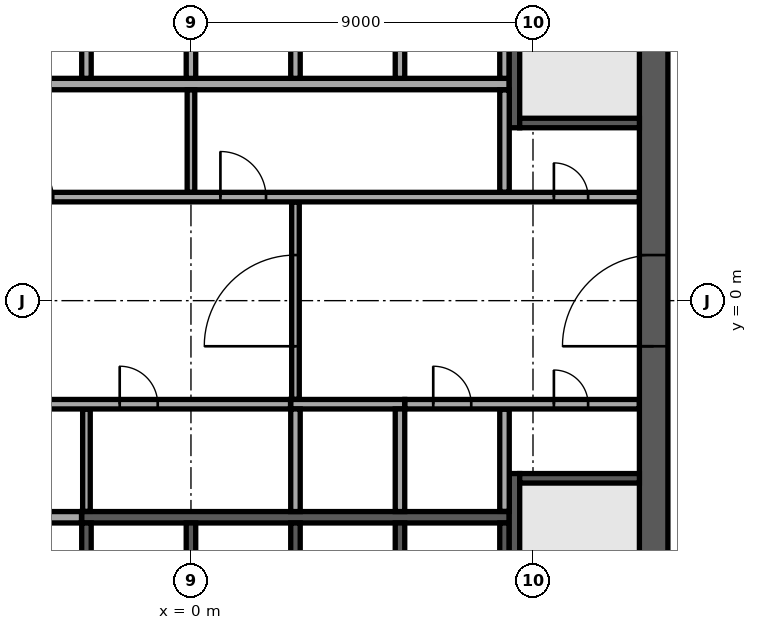
"""IFC4 building model, lengths in metres.
Left out: names, types, materials, properties, quantities, classifications, styles, units other than length and angle.
Written with IfcOpenShell. Run it as: python <this file> out.ifc"""

import sys

from ifc_helpers import new_model, si_unit, direction, frame, frame_2d, origin, place, context, subcontext, project, spatial, rectangle, extrude, element, fill, save


model = new_model("IFC4")
c1 = context("Model", 3, precision=1e-05, world=origin(), true_north=direction((0.0, 1.0)))
c2 = subcontext(c1, "Body", "Model", "MODEL_VIEW")
j1 = project(units=[si_unit("LENGTHUNIT", "METRE"), si_unit("PLANEANGLEUNIT", "RADIAN")], contexts=[c1])
p1 = place(None, origin())
s1 = spatial("IfcSite", under=j1, at=p1, CompositionType="ELEMENT")
p2 = place(p1, origin())
s2 = spatial("IfcBuilding", under=s1, at=p2, CompositionType="ELEMENT")
p3 = place(p2, frame((0.0, 0.0, 242.9)))
s3 = spatial("IfcBuildingStorey", under=s2, at=p3, CompositionType="ELEMENT", Elevation=242.9)
p4 = place(p3, frame((12.175, -11.8, 0.0), z_axis=(0.0, 0.0, 1.0), x_axis=(0.0, 1.0, 0.0)))
e1 = element("IfcWall", 1, at=p4, inside=s3, PredefinedType="SHEAR", context=c2, shape_type="SweptSolid", body=[
    extrude(rectangle(XDim=23.6, YDim=0.75, at=frame_2d((11.8, 0.0))), origin(), (0.0, 0.0, 1.0), 3.64),
])
p5 = place(p4, frame((10.6, 0.0, 0.0)))
e2 = element("IfcOpeningElement", 2, at=p5, cuts=e1, PredefinedType="OPENING", context=c2, shape_type="SweptSolid", body=[
    extrude(rectangle(XDim=2.4, YDim=2.4, at=frame_2d((1.2, 1.2))), frame((0.0, 0.385, 0.0), z_axis=(0.0, -1.0, 0.0), x_axis=(1.0, 0.0, 0.0)), (0.0, 0.0, 1.0), 0.77),
])
p6 = place(p3, frame((-8.375, 5.7, 0.0), z_axis=(0.0, 0.0, 1.0), x_axis=(1.0, 0.0, 0.0)))
e3 = element("IfcWall", 3, at=p6, inside=s3, PredefinedType="SOLIDWALL", context=c2, shape_type="SweptSolid", body=[
    extrude(rectangle(XDim=16.75, YDim=0.3, at=frame_2d((8.375, 0.0))), origin(), (0.0, 0.0, 1.0), 3.64),
])
p7 = place(p3, frame((-2.875, -5.7, 0.0), z_axis=(0.0, 0.0, 1.0), x_axis=(1.0, 0.0, 0.0)))
e4 = element("IfcWall", 4, at=p7, inside=s3, PredefinedType="SOLIDWALL", context=c2, shape_type="SweptSolid", body=[
    extrude(rectangle(XDim=11.25, YDim=0.3, at=frame_2d((5.625, 0.0))), origin(), (0.0, 0.0, 1.0), 3.64),
])
for number, where, z_axis, x_axis in (
    (5, (-2.75, 5.85, 0.0), (0.0, 0.0, 1.0), (0.0, 1.0, 0.0)),
    (6, (0.0, 5.85, 0.0), (0.0, 0.0, 1.0), (0.0, 1.0, 0.0)),
    (7, (2.75, 5.85, 0.0), (0.0, 0.0, 1.0), (0.0, 1.0, 0.0)),
    (8, (5.5, 5.85, 0.0), (0.0, 0.0, 1.0), (0.0, 1.0, 0.0)),
    (9, (8.25, 5.85, 0.0), (0.0, 0.0, 1.0), (0.0, 1.0, 0.0)),
):
    element("IfcWall", number, at=place(p3, frame(where, z_axis=z_axis, x_axis=x_axis)), inside=s3, PredefinedType="SOLIDWALL", context=c2, shape_type="SweptSolid", body=[
        extrude(rectangle(XDim=2.7, YDim=0.25, at=frame_2d((1.35, 0.0))), origin(), (0.0, 0.0, 1.0), 3.64),
    ])
p8 = place(p3, frame((2.625, -2.725, 0.0), z_axis=(0.0, 0.0, 1.0), x_axis=(1.0, 0.0, 0.0)))
e10 = element("IfcWall", 10, at=p8, inside=s3, PredefinedType="SOLIDWALL", context=c2, shape_type="SweptSolid", body=[
    extrude(rectangle(XDim=3.0, YDim=0.25, at=frame_2d((1.5, 0.0))), origin(), (0.0, 0.0, 1.0), 3.64),
])
for number, where, z_axis, x_axis in (
    (11, (2.75, -5.55, 0.0), (0.0, 0.0, 1.0), (0.0, 1.0, 0.0)),
    (12, (5.5, -5.55, 0.0), (0.0, 0.0, 1.0), (0.0, 1.0, 0.0)),
    (13, (-2.75, -8.55, 0.0), (0.0, 0.0, 1.0), (0.0, 1.0, 0.0)),
    (14, (0.0, -8.55, 0.0), (0.0, 0.0, 1.0), (0.0, 1.0, 0.0)),
    (15, (2.75, -8.55, 0.0), (0.0, 0.0, 1.0), (0.0, 1.0, 0.0)),
    (16, (5.5, -8.55, 0.0), (0.0, 0.0, 1.0), (0.0, 1.0, 0.0)),
    (17, (8.25, -8.55, 0.0), (0.0, 0.0, 1.0), (0.0, 1.0, 0.0)),
):
    element("IfcWall", number, at=place(p3, frame(where, z_axis=z_axis, x_axis=x_axis)), inside=s3, PredefinedType="SOLIDWALL", context=c2, shape_type="SweptSolid", body=[
        extrude(rectangle(XDim=2.7, YDim=0.25, at=frame_2d((1.35, 0.0))), origin(), (0.0, 0.0, 1.0), 3.64),
    ])
p9 = place(p3, frame((8.512, 4.55, 0.0), z_axis=(0.0, 0.0, 1.0), x_axis=(0.0, 1.0, 0.0)))
e18 = element("IfcWall", 18, at=p9, inside=s3, PredefinedType="SOLIDWALL", context=c2, shape_type="SweptSolid", body=[
    extrude(rectangle(XDim=7.25, YDim=0.275, at=frame_2d((3.625, 0.0))), origin(), (0.0, 0.0, 1.0), 3.64),
])
p10 = place(p9, frame((6.0, 0.0, 0.0)))
e19 = element("IfcOpeningElement", 19, at=p10, cuts=e18, PredefinedType="OPENING", context=c2, shape_type="SweptSolid", body=[
    extrude(rectangle(XDim=1.0, YDim=2.1, at=frame_2d((0.5, 1.05))), frame((0.0, 0.147, 0.0), z_axis=(0.0, -1.0, 0.0), x_axis=(1.0, 0.0, 0.0)), (0.0, 0.0, 1.0), 0.295),
])
p11 = place(p3, frame((8.65, 4.675, 0.0), z_axis=(0.0, 0.0, 1.0), x_axis=(1.0, 0.0, 0.0)))
e20 = element("IfcWall", 20, at=p11, inside=s3, PredefinedType="SOLIDWALL", context=c2, shape_type="SweptSolid", body=[
    extrude(rectangle(XDim=3.15, YDim=0.25, at=frame_2d((1.575, 0.0))), origin(), (0.0, 0.0, 1.0), 3.64),
])
p12 = place(p3, frame((8.512, -4.55, 0.0), z_axis=(0.0, 0.0, 1.0), x_axis=(0.0, -1.0, 0.0)))
e21 = element("IfcWall", 21, at=p12, inside=s3, PredefinedType="SOLIDWALL", context=c2, shape_type="SweptSolid", body=[
    extrude(rectangle(XDim=7.25, YDim=0.275, at=frame_2d((3.625, 0.0))), origin(), (0.0, 0.0, 1.0), 3.64),
])
p13 = place(p12, frame((6.0, 0.0, 0.0)))
e22 = element("IfcOpeningElement", 22, at=p13, cuts=e21, PredefinedType="OPENING", context=c2, shape_type="SweptSolid", body=[
    extrude(rectangle(XDim=1.0, YDim=2.1, at=frame_2d((0.5, 1.05))), frame((0.0, 0.147, 0.0), z_axis=(0.0, -1.0, 0.0), x_axis=(1.0, 0.0, 0.0)), (0.0, 0.0, 1.0), 0.295),
])
p14 = place(p3, frame((8.65, -4.675, 0.0), z_axis=(0.0, 0.0, 1.0), x_axis=(1.0, 0.0, 0.0)))
e23 = element("IfcWall", 23, at=p14, inside=s3, PredefinedType="SOLIDWALL", context=c2, shape_type="SweptSolid", body=[
    extrude(rectangle(XDim=3.15, YDim=0.25, at=frame_2d((1.575, 0.0))), origin(), (0.0, 0.0, 1.0), 3.64),
])
p15 = place(p3, frame((-8.35, -5.7, 0.0), z_axis=(0.0, 0.0, 1.0), x_axis=(1.0, 0.0, 0.0)))
e24 = element("IfcWall", 24, at=p15, inside=s3, PredefinedType="PARTITIONING", context=c2, shape_type="SweptSolid", body=[
    extrude(rectangle(XDim=5.47, YDim=0.3, at=frame_2d((2.735, 0.0))), origin(), (0.0, 0.0, 1.0), 3.64),
])
p16 = place(p3, frame((-2.75, -5.545, 0.0), z_axis=(0.0, 0.0, 1.0), x_axis=(0.0, 1.0, 0.0)))
e25 = element("IfcWall", 25, at=p16, inside=s3, PredefinedType="PARTITIONING", context=c2, shape_type="SweptSolid", body=[
    extrude(rectangle(XDim=2.69, YDim=0.2, at=frame_2d((1.345, 0.0))), origin(), (0.0, 0.0, 1.0), 3.64),
])
p17 = place(p3, frame((8.25, -5.545, 0.0), z_axis=(0.0, 0.0, 1.0), x_axis=(0.0, 1.0, 0.0)))
e26 = element("IfcWall", 26, at=p17, inside=s3, PredefinedType="PARTITIONING", context=c2, shape_type="SweptSolid", body=[
    extrude(rectangle(XDim=2.69, YDim=0.25, at=frame_2d((1.345, 0.0))), origin(), (0.0, 0.0, 1.0), 3.64),
])
p18 = place(p3, frame((-11.795, -2.725, 0.0), z_axis=(0.0, 0.0, 1.0), x_axis=(1.0, 0.0, 0.0)))
e27 = element("IfcWall", 27, at=p18, inside=s3, PredefinedType="PARTITIONING", context=c2, shape_type="SweptSolid", body=[
    extrude(rectangle(XDim=14.415, YDim=0.25, at=frame_2d((7.208, 0.0))), origin(), (0.0, 0.0, 1.0), 3.64),
])
p19 = place(p18, frame((1.295, 0.0, 0.0)))
e28 = element("IfcOpeningElement", 28, at=p19, cuts=e27, PredefinedType="OPENING", context=c2, shape_type="SweptSolid", body=[
    extrude(rectangle(XDim=1.0, YDim=2.1, at=frame_2d((0.5, 1.05))), frame((0.0, 0.135, 0.0), z_axis=(0.0, -1.0, 0.0), x_axis=(1.0, 0.0, 0.0)), (0.0, 0.0, 1.0), 0.27),
])
p20 = place(p18, frame((4.42, 0.0, 0.0)))
e29 = element("IfcOpeningElement", 29, at=p20, cuts=e27, PredefinedType="OPENING", context=c2, shape_type="SweptSolid", body=[
    extrude(rectangle(XDim=1.0, YDim=2.1, at=frame_2d((0.5, 1.05))), frame((0.0, 0.135, 0.0), z_axis=(0.0, -1.0, 0.0), x_axis=(1.0, 0.0, 0.0)), (0.0, 0.0, 1.0), 0.27),
])
p21 = place(p18, frame((9.92, 0.0, 0.0)))
e30 = element("IfcOpeningElement", 30, at=p21, cuts=e27, PredefinedType="OPENING", context=c2, shape_type="SweptSolid", body=[
    extrude(rectangle(XDim=1.0, YDim=2.1, at=frame_2d((0.5, 1.05))), frame((0.0, 0.135, 0.0), z_axis=(0.0, -1.0, 0.0), x_axis=(1.0, 0.0, 0.0)), (0.0, 0.0, 1.0), 0.27),
])
p22 = place(p3, frame((5.63, -2.725, 0.0), z_axis=(0.0, 0.0, 1.0), x_axis=(1.0, 0.0, 0.0)))
e31 = element("IfcWall", 31, at=p22, inside=s3, PredefinedType="PARTITIONING", context=c2, shape_type="SweptSolid", body=[
    extrude(rectangle(XDim=6.165, YDim=0.25, at=frame_2d((3.083, 0.0))), origin(), (0.0, 0.0, 1.0), 3.64),
])
p23 = place(p22, frame((0.745, 0.0, 0.0)))
e32 = element("IfcOpeningElement", 32, at=p23, cuts=e31, PredefinedType="OPENING", context=c2, shape_type="SweptSolid", body=[
    extrude(rectangle(XDim=1.0, YDim=2.1, at=frame_2d((0.5, 1.05))), frame((0.0, 0.135, 0.0), z_axis=(0.0, -1.0, 0.0), x_axis=(1.0, 0.0, 0.0)), (0.0, 0.0, 1.0), 0.27),
])
p24 = place(p22, frame((3.92, 0.0, 0.0)))
e33 = element("IfcOpeningElement", 33, at=p24, cuts=e31, PredefinedType="OPENING", context=c2, shape_type="SweptSolid", body=[
    extrude(rectangle(XDim=0.9, YDim=2.1, at=frame_2d((0.45, 1.05))), frame((0.0, 0.135, 0.0), z_axis=(0.0, -1.0, 0.0), x_axis=(1.0, 0.0, 0.0)), (0.0, 0.0, 1.0), 0.27),
])
p25 = place(p3, frame((2.75, -2.595, 0.0), z_axis=(0.0, 0.0, 1.0), x_axis=(0.0, 1.0, 0.0)))
e34 = element("IfcWall", 34, at=p25, inside=s3, PredefinedType="PARTITIONING", context=c2, shape_type="SweptSolid", body=[
    extrude(rectangle(XDim=5.19, YDim=0.2, at=frame_2d((2.595, 0.0))), origin(), (0.0, 0.0, 1.0), 3.64),
])
p26 = place(p25, frame((1.395, 0.0, 0.0)))
e35 = element("IfcOpeningElement", 35, at=p26, cuts=e34, PredefinedType="OPENING", context=c2, shape_type="SweptSolid", body=[
    extrude(rectangle(XDim=2.4, YDim=2.4, at=frame_2d((1.2, 1.2))), frame((0.0, 0.11, 0.0), z_axis=(0.0, -1.0, 0.0), x_axis=(1.0, 0.0, 0.0)), (0.0, 0.0, 1.0), 0.22),
])
p27 = place(p3, frame((-11.795, 2.725, 0.0), z_axis=(0.0, 0.0, 1.0), x_axis=(1.0, 0.0, 0.0)))
e36 = element("IfcWall", 36, at=p27, inside=s3, PredefinedType="PARTITIONING", context=c2, shape_type="SweptSolid", body=[
    extrude(rectangle(XDim=23.59, YDim=0.25, at=frame_2d((11.795, 0.0))), origin(), (0.0, 0.0, 1.0), 3.64),
])
p28 = place(p27, frame((21.345, 0.0, 0.0)))
e37 = element("IfcOpeningElement", 37, at=p28, cuts=e36, PredefinedType="OPENING", context=c2, shape_type="SweptSolid", body=[
    extrude(rectangle(XDim=0.9, YDim=2.1, at=frame_2d((0.45, 1.05))), frame((0.0, 0.135, 0.0), z_axis=(0.0, -1.0, 0.0), x_axis=(1.0, 0.0, 0.0)), (0.0, 0.0, 1.0), 0.27),
])
p29 = place(p27, frame((1.345, 0.0, 0.0)))
e38 = element("IfcOpeningElement", 38, at=p29, cuts=e36, PredefinedType="OPENING", context=c2, shape_type="SweptSolid", body=[
    extrude(rectangle(XDim=0.9, YDim=2.1, at=frame_2d((0.45, 1.05))), frame((0.0, 0.135, 0.0), z_axis=(0.0, -1.0, 0.0), x_axis=(1.0, 0.0, 0.0)), (0.0, 0.0, 1.0), 0.27),
])
p30 = place(p27, frame((4.42, 0.0, 0.0)))
e39 = element("IfcOpeningElement", 39, at=p30, cuts=e36, PredefinedType="OPENING", context=c2, shape_type="SweptSolid", body=[
    extrude(rectangle(XDim=1.0, YDim=2.1, at=frame_2d((0.5, 1.05))), frame((0.0, 0.135, 0.0), z_axis=(0.0, -1.0, 0.0), x_axis=(1.0, 0.0, 0.0)), (0.0, 0.0, 1.0), 0.27),
])
p31 = place(p27, frame((7.17, 0.0, 0.0)))
e40 = element("IfcOpeningElement", 40, at=p31, cuts=e36, PredefinedType="OPENING", context=c2, shape_type="SweptSolid", body=[
    extrude(rectangle(XDim=1.0, YDim=2.1, at=frame_2d((0.5, 1.05))), frame((0.0, 0.135, 0.0), z_axis=(0.0, -1.0, 0.0), x_axis=(1.0, 0.0, 0.0)), (0.0, 0.0, 1.0), 0.27),
])
p32 = place(p27, frame((12.57, 0.0, 0.0)))
e41 = element("IfcOpeningElement", 41, at=p32, cuts=e36, PredefinedType="OPENING", context=c2, shape_type="SweptSolid", body=[
    extrude(rectangle(XDim=1.2, YDim=2.1, at=frame_2d((0.6, 1.05))), frame((0.0, 0.135, 0.0), z_axis=(0.0, -1.0, 0.0), x_axis=(1.0, 0.0, 0.0)), (0.0, 0.0, 1.0), 0.27),
])
p33 = place(p3, frame((0.0, 2.855, 0.0), z_axis=(0.0, 0.0, 1.0), x_axis=(0.0, 1.0, 0.0)))
e42 = element("IfcWall", 42, at=p33, inside=s3, PredefinedType="PARTITIONING", context=c2, shape_type="SweptSolid", body=[
    extrude(rectangle(XDim=2.69, YDim=0.2, at=frame_2d((1.345, 0.0))), origin(), (0.0, 0.0, 1.0), 3.64),
])
p34 = place(p3, frame((8.25, 2.855, 0.0), z_axis=(0.0, 0.0, 1.0), x_axis=(0.0, 1.0, 0.0)))
e43 = element("IfcWall", 43, at=p34, inside=s3, PredefinedType="PARTITIONING", context=c2, shape_type="SweptSolid", body=[
    extrude(rectangle(XDim=2.69, YDim=0.25, at=frame_2d((1.345, 0.0))), origin(), (0.0, 0.0, 1.0), 3.64),
])
p35 = place(p3, frame((5.206, -33.362, 0.0), z_axis=(0.0, 0.0, 1.0), x_axis=(0.573577438409, 0.81915134264, 0.0)))
e44 = element("IfcWall", 44, at=p35, inside=s3, PredefinedType="STANDARD", context=c2, shape_type="SweptSolid", body=[
    extrude(rectangle(XDim=48.686, YDim=0.6, at=frame_2d((24.343, 0.0))), origin(), (0.0, 0.0, 1.0), 3.64),
])
p36 = place(p35, frame((1.213, 0.0, 0.9)))
e45 = element("IfcOpeningElement", 45, at=p36, cuts=e44, PredefinedType="OPENING", context=c2, shape_type="SweptSolid", body=[
    extrude(rectangle(XDim=2.0, YDim=2.1, at=frame_2d((1.0, 1.05))), frame((0.0, 0.31, 0.0), z_axis=(0.0, -1.0, 0.0), x_axis=(1.0, 0.0, 0.0)), (0.0, 0.0, 1.0), 0.62),
])
p37 = place(p35, frame((5.639, 0.0, 0.9)))
e46 = element("IfcOpeningElement", 46, at=p37, cuts=e44, PredefinedType="OPENING", context=c2, shape_type="SweptSolid", body=[
    extrude(rectangle(XDim=2.0, YDim=2.1, at=frame_2d((1.0, 1.05))), frame((0.0, 0.31, 0.0), z_axis=(0.0, -1.0, 0.0), x_axis=(1.0, 0.0, 0.0)), (0.0, 0.0, 1.0), 0.62),
])
p38 = place(p35, frame((10.065, 0.0, 0.9)))
e47 = element("IfcOpeningElement", 47, at=p38, cuts=e44, PredefinedType="OPENING", context=c2, shape_type="SweptSolid", body=[
    extrude(rectangle(XDim=2.0, YDim=2.1, at=frame_2d((1.0, 1.05))), frame((0.0, 0.31, 0.0), z_axis=(0.0, -1.0, 0.0), x_axis=(1.0, 0.0, 0.0)), (0.0, 0.0, 1.0), 0.62),
])
p39 = place(p35, frame((14.491, 0.0, 0.9)))
e48 = element("IfcOpeningElement", 48, at=p39, cuts=e44, PredefinedType="OPENING", context=c2, shape_type="SweptSolid", body=[
    extrude(rectangle(XDim=2.0, YDim=2.1, at=frame_2d((1.0, 1.05))), frame((0.0, 0.31, 0.0), z_axis=(0.0, -1.0, 0.0), x_axis=(1.0, 0.0, 0.0)), (0.0, 0.0, 1.0), 0.62),
])
p40 = place(p35, frame((18.917, 0.0, 0.9)))
e49 = element("IfcOpeningElement", 49, at=p40, cuts=e44, PredefinedType="OPENING", context=c2, shape_type="SweptSolid", body=[
    extrude(rectangle(XDim=2.0, YDim=2.1, at=frame_2d((1.0, 1.05))), frame((0.0, 0.31, 0.0), z_axis=(0.0, -1.0, 0.0), x_axis=(1.0, 0.0, 0.0)), (0.0, 0.0, 1.0), 0.62),
])
p41 = place(p35, frame((23.343, 0.0, 0.9)))
e50 = element("IfcOpeningElement", 50, at=p41, cuts=e44, PredefinedType="OPENING", context=c2, shape_type="SweptSolid", body=[
    extrude(rectangle(XDim=2.0, YDim=2.1, at=frame_2d((1.0, 1.05))), frame((0.0, 0.31, 0.0), z_axis=(0.0, -1.0, 0.0), x_axis=(1.0, 0.0, 0.0)), (0.0, 0.0, 1.0), 0.62),
])
p42 = place(p35, frame((27.769, 0.0, 0.9)))
e51 = element("IfcOpeningElement", 51, at=p42, cuts=e44, PredefinedType="OPENING", context=c2, shape_type="SweptSolid", body=[
    extrude(rectangle(XDim=2.0, YDim=2.1, at=frame_2d((1.0, 1.05))), frame((0.0, 0.31, 0.0), z_axis=(0.0, -1.0, 0.0), x_axis=(1.0, 0.0, 0.0)), (0.0, 0.0, 1.0), 0.62),
])
p43 = place(p35, frame((32.195, 0.0, 0.9)))
e52 = element("IfcOpeningElement", 52, at=p43, cuts=e44, PredefinedType="OPENING", context=c2, shape_type="SweptSolid", body=[
    extrude(rectangle(XDim=2.0, YDim=2.1, at=frame_2d((1.0, 1.05))), frame((0.0, 0.31, 0.0), z_axis=(0.0, -1.0, 0.0), x_axis=(1.0, 0.0, 0.0)), (0.0, 0.0, 1.0), 0.62),
])
p44 = place(p35, frame((36.621, 0.0, 0.9)))
e53 = element("IfcOpeningElement", 53, at=p44, cuts=e44, PredefinedType="OPENING", context=c2, shape_type="SweptSolid", body=[
    extrude(rectangle(XDim=2.0, YDim=2.1, at=frame_2d((1.0, 1.05))), frame((0.0, 0.31, 0.0), z_axis=(0.0, -1.0, 0.0), x_axis=(1.0, 0.0, 0.0)), (0.0, 0.0, 1.0), 0.62),
])
p45 = place(p35, frame((41.047, 0.0, 0.9)))
e54 = element("IfcOpeningElement", 54, at=p45, cuts=e44, PredefinedType="OPENING", context=c2, shape_type="SweptSolid", body=[
    extrude(rectangle(XDim=2.0, YDim=2.1, at=frame_2d((1.0, 1.05))), frame((0.0, 0.31, 0.0), z_axis=(0.0, -1.0, 0.0), x_axis=(1.0, 0.0, 0.0)), (0.0, 0.0, 1.0), 0.62),
])
p46 = place(p35, frame((45.473, 0.0, 0.9)))
e55 = element("IfcOpeningElement", 55, at=p46, cuts=e44, PredefinedType="OPENING", context=c2, shape_type="SweptSolid", body=[
    extrude(rectangle(XDim=2.0, YDim=2.1, at=frame_2d((1.0, 1.05))), frame((0.0, 0.31, 0.0), z_axis=(0.0, -1.0, 0.0), x_axis=(1.0, 0.0, 0.0)), (0.0, 0.0, 1.0), 0.62),
])
p47 = place(p5, origin())
e56 = element("IfcDoor", 56, at=p47, inside=s3, OperationType="SINGLE_SWING_LEFT", PredefinedType="DOOR", context=c2, shape_type="SweptSolid", body=[
    extrude(rectangle(XDim=2.4, YDim=2.4, at=frame_2d((1.2, 1.2))), frame((0.0, 0.025, 0.0), z_axis=(0.0, -1.0, 0.0), x_axis=(1.0, 0.0, 0.0)), (0.0, 0.0, 1.0), 0.05),
])
fill(e2, e56)
p48 = place(p23, origin())
e57 = element("IfcDoor", 57, at=p48, inside=s3, OperationType="SINGLE_SWING_RIGHT", PredefinedType="DOOR", context=c2, shape_type="SweptSolid", body=[
    extrude(rectangle(XDim=1.0, YDim=2.1, at=frame_2d((0.5, 1.05))), frame((0.0, 0.025, 0.0), z_axis=(0.0, -1.0, 0.0), x_axis=(1.0, 0.0, 0.0)), (0.0, 0.0, 1.0), 0.05),
])
fill(e32, e57)
p49 = place(p28, origin())
e58 = element("IfcDoor", 58, at=p49, inside=s3, OperationType="SINGLE_SWING_RIGHT", PredefinedType="DOOR", context=c2, shape_type="SweptSolid", body=[
    extrude(rectangle(XDim=0.9, YDim=2.1, at=frame_2d((0.45, 1.05))), frame((0.0, 0.025, 0.0), z_axis=(0.0, -1.0, 0.0), x_axis=(1.0, 0.0, 0.0)), (0.0, 0.0, 1.0), 0.05),
])
fill(e37, e58)
p50 = place(p24, origin())
e59 = element("IfcDoor", 59, at=p50, inside=s3, OperationType="SINGLE_SWING_RIGHT", PredefinedType="DOOR", context=c2, shape_type="SweptSolid", body=[
    extrude(rectangle(XDim=0.9, YDim=2.1, at=frame_2d((0.45, 1.05))), frame((0.0, 0.025, 0.0), z_axis=(0.0, -1.0, 0.0), x_axis=(1.0, 0.0, 0.0)), (0.0, 0.0, 1.0), 0.05),
])
fill(e33, e59)
p51 = place(p31, origin())
e60 = element("IfcDoor", 60, at=p51, inside=s3, OperationType="SINGLE_SWING_RIGHT", PredefinedType="DOOR", context=c2, shape_type="SweptSolid", body=[
    extrude(rectangle(XDim=1.0, YDim=2.1, at=frame_2d((0.5, 1.05))), frame((0.0, 0.025, 0.0), z_axis=(0.0, -1.0, 0.0), x_axis=(1.0, 0.0, 0.0)), (0.0, 0.0, 1.0), 0.05),
])
fill(e40, e60)
p52 = place(p32, origin())
e61 = element("IfcDoor", 61, at=p52, inside=s3, OperationType="SINGLE_SWING_LEFT", PredefinedType="DOOR", context=c2, shape_type="SweptSolid", body=[
    extrude(rectangle(XDim=1.2, YDim=2.1, at=frame_2d((0.6, 1.05))), frame((0.0, 0.025, 0.0), z_axis=(0.0, -1.0, 0.0), x_axis=(1.0, 0.0, 0.0)), (0.0, 0.0, 1.0), 0.05),
])
fill(e41, e61)
p53 = place(p21, origin())
e62 = element("IfcDoor", 62, at=p53, inside=s3, OperationType="SINGLE_SWING_RIGHT", PredefinedType="DOOR", context=c2, shape_type="SweptSolid", body=[
    extrude(rectangle(XDim=1.0, YDim=2.1, at=frame_2d((0.5, 1.05))), frame((0.0, 0.025, 0.0), z_axis=(0.0, -1.0, 0.0), x_axis=(1.0, 0.0, 0.0)), (0.0, 0.0, 1.0), 0.05),
])
fill(e30, e62)
p54 = place(p26, origin())
e63 = element("IfcDoor", 63, at=p54, inside=s3, OperationType="DOUBLE_DOOR_DOUBLE_SWING", PredefinedType="DOOR", context=c2, shape_type="SweptSolid", body=[
    extrude(rectangle(XDim=2.4, YDim=2.4, at=frame_2d((1.2, 1.2))), frame((0.0, 0.025, 0.0), z_axis=(0.0, -1.0, 0.0), x_axis=(1.0, 0.0, 0.0)), (0.0, 0.0, 1.0), 0.05),
])
fill(e35, e63)
save(model, sys.argv[1])
